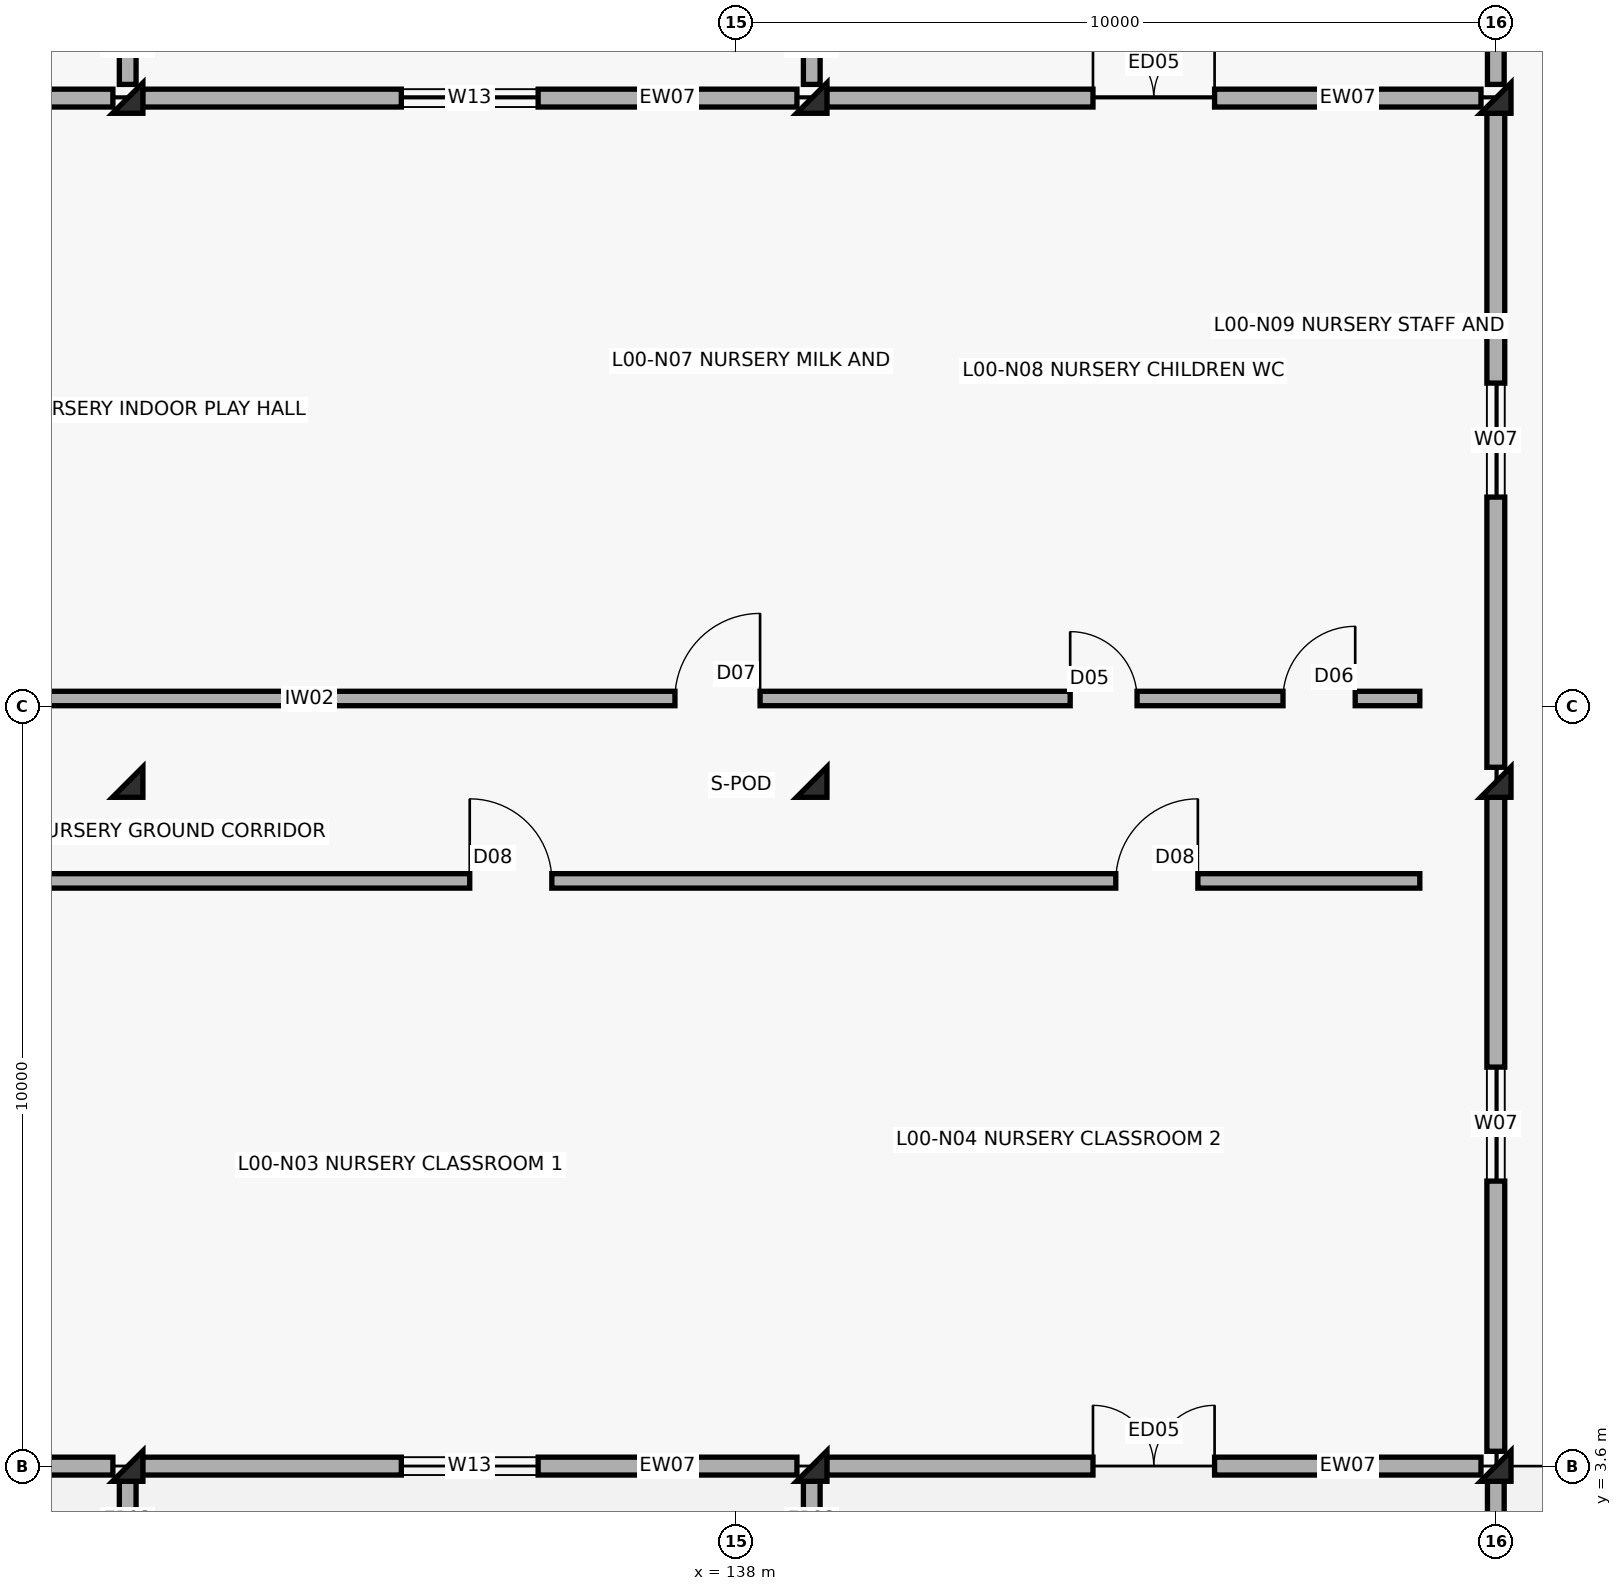
"""IFC4 building model, lengths in metres.
Left out: names, types, materials, properties, quantities, classifications, styles, units other than length and angle.
Written with IfcOpenShell. Run it as: python <this file> out.ifc"""

import sys

from ifc_helpers import new_model, si_unit, direction, frame, frame_2d, origin, origin_2d, place, context, subcontext, project, spatial, rectangle, extrude, element, fill, save


model = new_model("IFC4")
c1 = context("Model", 3, precision=1e-05, world=origin(), true_north=direction((0.0, 1.0)))
c2 = subcontext(c1, "Body", "Model", "MODEL_VIEW")
j1 = project(units=[si_unit("LENGTHUNIT", "METRE"), si_unit("PLANEANGLEUNIT", "RADIAN")], contexts=[c1])
p1 = place(None, origin())
s1 = spatial("IfcSite", under=j1, at=p1, CompositionType="ELEMENT")
p2 = place(p1, origin())
s2 = spatial("IfcBuilding", under=s1, at=p2, CompositionType="ELEMENT")
p3 = place(p2, origin())
s3 = spatial("IfcBuildingStorey", under=s2, at=p3, CompositionType="ELEMENT", Elevation=0.0)
for number, where, z_axis, x_axis in (
    (1, (130.0, 3.6, 0.0), (0.0, 0.0, 1.0), (1.0, 0.0, 0.0)),
    (2, (130.0, 12.6, 0.0), (0.0, 0.0, 1.0), (1.0, 0.0, 0.0)),
    (3, (130.0, 21.6, 0.0), (0.0, 0.0, 1.0), (1.0, 0.0, 0.0)),
    (4, (139.0, 3.6, 0.0), (0.0, 0.0, 1.0), (1.0, 0.0, 0.0)),
    (5, (139.0, 12.6, 0.0), (0.0, 0.0, 1.0), (1.0, 0.0, 0.0)),
    (6, (139.0, 21.6, 0.0), (0.0, 0.0, 1.0), (1.0, 0.0, 0.0)),
    (7, (148.0, 3.6, 0.0), (0.0, 0.0, 1.0), (1.0, 0.0, 0.0)),
    (8, (148.0, 12.6, 0.0), (0.0, 0.0, 1.0), (1.0, 0.0, 0.0)),
    (9, (148.0, 21.6, 0.0), (0.0, 0.0, 1.0), (1.0, 0.0, 0.0)),
):
    element("IfcColumn", number, at=place(p3, frame(where, z_axis=z_axis, x_axis=x_axis)), inside=s3, PredefinedType="COLUMN", context=c2, shape_type="SweptSolid", body=[
        extrude(rectangle(XDim=0.4, YDim=0.4, at=origin_2d()), origin(), (0.0, 0.0, 1.0), 4.5),
    ])
p4 = place(p3, frame((121.195, 3.6, 0.0), z_axis=(0.0, 0.0, 1.0), x_axis=(1.0, 0.0, 0.0)))
e10 = element("IfcWall", 10, at=p4, inside=s3, PredefinedType="SOLIDWALL", context=c2, shape_type="SweptSolid", body=[
    extrude(rectangle(XDim=8.61, YDim=0.235, at=frame_2d((4.305, 0.0))), origin(), (0.0, 0.0, 1.0), 3.5),
])
p5 = place(p4, frame((3.505, 0.0, 0.0)))
e11 = element("IfcOpeningElement", 11, at=p5, cuts=e10, PredefinedType="OPENING", context=c2, shape_type="SweptSolid", body=[
    extrude(rectangle(XDim=1.6, YDim=2.2, at=frame_2d((0.8, 1.1))), frame((0.0, 0.127, 0.0), z_axis=(0.0, -1.0, 0.0), x_axis=(1.0, 0.0, 0.0)), (0.0, 0.0, 1.0), 0.255),
])
p6 = place(p3, frame((130.195, 3.6, 0.0), z_axis=(0.0, 0.0, 1.0), x_axis=(1.0, 0.0, 0.0)))
e12 = element("IfcWall", 12, at=p6, inside=s3, PredefinedType="SOLIDWALL", context=c2, shape_type="SweptSolid", body=[
    extrude(rectangle(XDim=8.61, YDim=0.235, at=frame_2d((4.305, 0.0))), origin(), (0.0, 0.0, 1.0), 3.5),
])
p7 = place(p6, frame((3.405, 0.0, 0.45)))
e13 = element("IfcOpeningElement", 13, at=p7, cuts=e12, PredefinedType="OPENING", context=c2, shape_type="SweptSolid", body=[
    extrude(rectangle(XDim=1.8, YDim=1.8, at=frame_2d((0.9, 0.9))), frame((0.0, 0.127, 0.0), z_axis=(0.0, -1.0, 0.0), x_axis=(1.0, 0.0, 0.0)), (0.0, 0.0, 1.0), 0.255),
])
p8 = place(p3, frame((139.195, 3.6, 0.0), z_axis=(0.0, 0.0, 1.0), x_axis=(1.0, 0.0, 0.0)))
e14 = element("IfcWall", 14, at=p8, inside=s3, PredefinedType="SOLIDWALL", context=c2, shape_type="SweptSolid", body=[
    extrude(rectangle(XDim=8.61, YDim=0.235, at=frame_2d((4.305, 0.0))), origin(), (0.0, 0.0, 1.0), 3.5),
])
p9 = place(p8, frame((3.505, 0.0, 0.0)))
e15 = element("IfcOpeningElement", 15, at=p9, cuts=e14, PredefinedType="OPENING", context=c2, shape_type="SweptSolid", body=[
    extrude(rectangle(XDim=1.6, YDim=2.2, at=frame_2d((0.8, 1.1))), frame((0.0, 0.127, 0.0), z_axis=(0.0, -1.0, 0.0), x_axis=(1.0, 0.0, 0.0)), (0.0, 0.0, 1.0), 0.255),
])
p10 = place(p3, frame((121.195, 21.6, 0.0), z_axis=(0.0, 0.0, 1.0), x_axis=(1.0, 0.0, 0.0)))
e16 = element("IfcWall", 16, at=p10, inside=s3, PredefinedType="SOLIDWALL", context=c2, shape_type="SweptSolid", body=[
    extrude(rectangle(XDim=8.61, YDim=0.235, at=frame_2d((4.305, 0.0))), origin(), (0.0, 0.0, 1.0), 3.5),
])
p11 = place(p10, frame((3.505, 0.0, 0.0)))
e17 = element("IfcOpeningElement", 17, at=p11, cuts=e16, PredefinedType="OPENING", context=c2, shape_type="SweptSolid", body=[
    extrude(rectangle(XDim=1.6, YDim=2.2, at=frame_2d((0.8, 1.1))), frame((0.0, 0.127, 0.0), z_axis=(0.0, -1.0, 0.0), x_axis=(1.0, 0.0, 0.0)), (0.0, 0.0, 1.0), 0.255),
])
p12 = place(p3, frame((130.195, 21.6, 0.0), z_axis=(0.0, 0.0, 1.0), x_axis=(1.0, 0.0, 0.0)))
e18 = element("IfcWall", 18, at=p12, inside=s3, PredefinedType="SOLIDWALL", context=c2, shape_type="SweptSolid", body=[
    extrude(rectangle(XDim=8.61, YDim=0.235, at=frame_2d((4.305, 0.0))), origin(), (0.0, 0.0, 1.0), 3.5),
])
p13 = place(p12, frame((3.405, 0.0, 0.45)))
e19 = element("IfcOpeningElement", 19, at=p13, cuts=e18, PredefinedType="OPENING", context=c2, shape_type="SweptSolid", body=[
    extrude(rectangle(XDim=1.8, YDim=1.8, at=frame_2d((0.9, 0.9))), frame((0.0, 0.127, 0.0), z_axis=(0.0, -1.0, 0.0), x_axis=(1.0, 0.0, 0.0)), (0.0, 0.0, 1.0), 0.255),
])
p14 = place(p3, frame((139.195, 21.6, 0.0), z_axis=(0.0, 0.0, 1.0), x_axis=(1.0, 0.0, 0.0)))
e20 = element("IfcWall", 20, at=p14, inside=s3, PredefinedType="SOLIDWALL", context=c2, shape_type="SweptSolid", body=[
    extrude(rectangle(XDim=8.61, YDim=0.235, at=frame_2d((4.305, 0.0))), origin(), (0.0, 0.0, 1.0), 3.5),
])
p15 = place(p14, frame((3.505, 0.0, 0.0)))
e21 = element("IfcOpeningElement", 21, at=p15, cuts=e20, PredefinedType="OPENING", context=c2, shape_type="SweptSolid", body=[
    extrude(rectangle(XDim=1.6, YDim=2.2, at=frame_2d((0.8, 1.1))), frame((0.0, 0.127, 0.0), z_axis=(0.0, -1.0, 0.0), x_axis=(1.0, 0.0, 0.0)), (0.0, 0.0, 1.0), 0.255),
])
p16 = place(p3, frame((148.0, 3.795, 0.0), z_axis=(0.0, 0.0, 1.0), x_axis=(0.0, 1.0, 0.0)))
e22 = element("IfcWall", 22, at=p16, inside=s3, PredefinedType="SOLIDWALL", context=c2, shape_type="SweptSolid", body=[
    extrude(rectangle(XDim=8.61, YDim=0.235, at=frame_2d((4.305, 0.0))), origin(), (0.0, 0.0, 1.0), 3.5),
])
p17 = place(p16, frame((3.555, 0.0, 0.45)))
e23 = element("IfcOpeningElement", 23, at=p17, cuts=e22, PredefinedType="OPENING", context=c2, shape_type="SweptSolid", body=[
    extrude(rectangle(XDim=1.5, YDim=1.65, at=frame_2d((0.75, 0.825))), frame((0.0, 0.127, 0.0), z_axis=(0.0, -1.0, 0.0), x_axis=(1.0, 0.0, 0.0)), (0.0, 0.0, 1.0), 0.255),
])
p18 = place(p3, frame((148.0, 12.795, 0.0), z_axis=(0.0, 0.0, 1.0), x_axis=(0.0, 1.0, 0.0)))
e24 = element("IfcWall", 24, at=p18, inside=s3, PredefinedType="SOLIDWALL", context=c2, shape_type="SweptSolid", body=[
    extrude(rectangle(XDim=8.61, YDim=0.235, at=frame_2d((4.305, 0.0))), origin(), (0.0, 0.0, 1.0), 3.5),
])
p19 = place(p18, frame((3.555, 0.0, 0.45)))
e25 = element("IfcOpeningElement", 25, at=p19, cuts=e24, PredefinedType="OPENING", context=c2, shape_type="SweptSolid", body=[
    extrude(rectangle(XDim=1.5, YDim=1.65, at=frame_2d((0.75, 0.825))), frame((0.0, 0.127, 0.0), z_axis=(0.0, -1.0, 0.0), x_axis=(1.0, 0.0, 0.0)), (0.0, 0.0, 1.0), 0.255),
])
for number, where, z_axis, x_axis in (
    (26, (130.0, 2.55, 0.0), (0.0, 0.0, 1.0), (0.0, 1.0, 0.0)),
    (27, (130.0, 21.78, 0.0), (0.0, 0.0, 1.0), (0.0, 1.0, 0.0)),
    (28, (139.0, 2.55, 0.0), (0.0, 0.0, 1.0), (0.0, 1.0, 0.0)),
    (29, (139.0, 21.78, 0.0), (0.0, 0.0, 1.0), (0.0, 1.0, 0.0)),
    (30, (148.0, 2.55, 0.0), (0.0, 0.0, 1.0), (0.0, 1.0, 0.0)),
    (31, (148.0, 21.78, 0.0), (0.0, 0.0, 1.0), (0.0, 1.0, 0.0)),
):
    element("IfcWall", number, at=place(p3, frame(where, z_axis=z_axis, x_axis=x_axis)), inside=s3, PredefinedType="PARAPET", context=c2, shape_type="SweptSolid", body=[
        extrude(rectangle(XDim=0.87, YDim=0.22, at=frame_2d((0.435, 0.0))), origin(), (0.0, 0.0, 1.0), 4.5),
    ])
p20 = place(p3, frame((113.0, 11.3, 0.0), z_axis=(0.0, 0.0, 1.0), x_axis=(1.0, 0.0, 0.0)))
e32 = element("IfcWall", 32, at=p20, inside=s3, PredefinedType="SOLIDWALL", context=c2, shape_type="SweptSolid", body=[
    extrude(rectangle(XDim=34.0, YDim=0.19, at=frame_2d((17.0, 0.0))), origin(), (0.0, 0.0, 1.0), 3.6),
])
p21 = place(p20, frame((3.5, 0.0, 0.0)))
e33 = element("IfcOpeningElement", 33, at=p21, cuts=e32, PredefinedType="OPENING", context=c2, shape_type="SweptSolid", body=[
    extrude(rectangle(XDim=1.08, YDim=2.15, at=frame_2d((0.54, 1.075))), frame((0.0, 0.105, 0.0), z_axis=(0.0, -1.0, 0.0), x_axis=(1.0, 0.0, 0.0)), (0.0, 0.0, 1.0), 0.21),
])
p22 = place(p20, frame((12.5, 0.0, 0.0)))
e34 = element("IfcOpeningElement", 34, at=p22, cuts=e32, PredefinedType="OPENING", context=c2, shape_type="SweptSolid", body=[
    extrude(rectangle(XDim=1.08, YDim=2.15, at=frame_2d((0.54, 1.075))), frame((0.0, 0.105, 0.0), z_axis=(0.0, -1.0, 0.0), x_axis=(1.0, 0.0, 0.0)), (0.0, 0.0, 1.0), 0.21),
])
p23 = place(p20, frame((21.5, 0.0, 0.0)))
e35 = element("IfcOpeningElement", 35, at=p23, cuts=e32, PredefinedType="OPENING", context=c2, shape_type="SweptSolid", body=[
    extrude(rectangle(XDim=1.08, YDim=2.15, at=frame_2d((0.54, 1.075))), frame((0.0, 0.105, 0.0), z_axis=(0.0, -1.0, 0.0), x_axis=(1.0, 0.0, 0.0)), (0.0, 0.0, 1.0), 0.21),
])
p24 = place(p20, frame((30.0, 0.0, 0.0)))
e36 = element("IfcOpeningElement", 36, at=p24, cuts=e32, PredefinedType="OPENING", context=c2, shape_type="SweptSolid", body=[
    extrude(rectangle(XDim=1.08, YDim=2.15, at=frame_2d((0.54, 1.075))), frame((0.0, 0.105, 0.0), z_axis=(0.0, -1.0, 0.0), x_axis=(1.0, 0.0, 0.0)), (0.0, 0.0, 1.0), 0.21),
])
p25 = place(p3, frame((125.0, 13.7, 0.0), z_axis=(0.0, 0.0, 1.0), x_axis=(1.0, 0.0, 0.0)))
e37 = element("IfcWall", 37, at=p25, inside=s3, PredefinedType="SOLIDWALL", context=c2, shape_type="SweptSolid", body=[
    extrude(rectangle(XDim=22.0, YDim=0.19, at=frame_2d((11.0, 0.0))), origin(), (0.0, 0.0, 1.0), 3.6),
])
p26 = place(p25, frame((1.5, 0.0, 0.0)))
e38 = element("IfcOpeningElement", 38, at=p26, cuts=e37, PredefinedType="OPENING", context=c2, shape_type="SweptSolid", body=[
    extrude(rectangle(XDim=1.08, YDim=2.15, at=frame_2d((0.54, 1.075))), frame((0.0, 0.105, 0.0), z_axis=(0.0, -1.0, 0.0), x_axis=(1.0, 0.0, 0.0)), (0.0, 0.0, 1.0), 0.21),
])
p27 = place(p25, frame((12.2, 0.0, 0.0)))
e39 = element("IfcOpeningElement", 39, at=p27, cuts=e37, PredefinedType="OPENING", context=c2, shape_type="SweptSolid", body=[
    extrude(rectangle(XDim=1.12, YDim=2.15, at=frame_2d((0.56, 1.075))), frame((0.0, 0.105, 0.0), z_axis=(0.0, -1.0, 0.0), x_axis=(1.0, 0.0, 0.0)), (0.0, 0.0, 1.0), 0.21),
])
p28 = place(p25, frame((17.4, 0.0, 0.0)))
e40 = element("IfcOpeningElement", 40, at=p28, cuts=e37, PredefinedType="OPENING", context=c2, shape_type="SweptSolid", body=[
    extrude(rectangle(XDim=0.88, YDim=2.1, at=frame_2d((0.44, 1.05))), frame((0.0, 0.105, 0.0), z_axis=(0.0, -1.0, 0.0), x_axis=(1.0, 0.0, 0.0)), (0.0, 0.0, 1.0), 0.21),
])
p29 = place(p25, frame((20.2, 0.0, 0.0)))
e41 = element("IfcOpeningElement", 41, at=p29, cuts=e37, PredefinedType="OPENING", context=c2, shape_type="SweptSolid", body=[
    extrude(rectangle(XDim=0.95, YDim=2.1, at=frame_2d((0.475, 1.05))), frame((0.0, 0.105, 0.0), z_axis=(0.0, -1.0, 0.0), x_axis=(1.0, 0.0, 0.0)), (0.0, 0.0, 1.0), 0.21),
])
p30 = place(p7, origin())
e42 = element("IfcWindow", 42, at=p30, inside=s3, PartitioningType="TRIPLE_PANEL_VERTICAL", PredefinedType="WINDOW", context=c2, shape_type="SweptSolid", body=[
    extrude(rectangle(XDim=1.8, YDim=1.8, at=frame_2d((0.9, 0.9))), frame((0.0, 0.03, 0.0), z_axis=(0.0, -1.0, 0.0), x_axis=(1.0, 0.0, 0.0)), (0.0, 0.0, 1.0), 0.06),
])
fill(e13, e42)
p31 = place(p9, origin())
e43 = element("IfcDoor", 43, at=p31, inside=s3, OperationType="DOUBLE_DOOR_SINGLE_SWING", PredefinedType="DOOR", context=c2, shape_type="SweptSolid", body=[
    extrude(rectangle(XDim=1.6, YDim=2.2, at=frame_2d((0.8, 1.1))), frame((0.0, 0.025, 0.0), z_axis=(0.0, -1.0, 0.0), x_axis=(1.0, 0.0, 0.0)), (0.0, 0.0, 1.0), 0.05),
])
fill(e15, e43)
p32 = place(p13, origin())
e44 = element("IfcWindow", 44, at=p32, inside=s3, PartitioningType="TRIPLE_PANEL_VERTICAL", PredefinedType="WINDOW", context=c2, shape_type="SweptSolid", body=[
    extrude(rectangle(XDim=1.8, YDim=1.8, at=frame_2d((0.9, 0.9))), frame((0.0, 0.03, 0.0), z_axis=(0.0, -1.0, 0.0), x_axis=(1.0, 0.0, 0.0)), (0.0, 0.0, 1.0), 0.06),
])
fill(e19, e44)
p33 = place(p15, origin())
e45 = element("IfcDoor", 45, at=p33, inside=s3, OperationType="DOUBLE_DOOR_SINGLE_SWING", PredefinedType="DOOR", context=c2, shape_type="SweptSolid", body=[
    extrude(rectangle(XDim=1.6, YDim=2.2, at=frame_2d((0.8, 1.1))), frame((0.0, 0.025, 0.0), z_axis=(0.0, -1.0, 0.0), x_axis=(1.0, 0.0, 0.0)), (0.0, 0.0, 1.0), 0.05),
])
fill(e21, e45)
p34 = place(p17, origin())
e46 = element("IfcWindow", 46, at=p34, inside=s3, PartitioningType="DOUBLE_PANEL_VERTICAL", PredefinedType="WINDOW", context=c2, shape_type="SweptSolid", body=[
    extrude(rectangle(XDim=1.5, YDim=1.65, at=frame_2d((0.75, 0.825))), frame((0.0, 0.03, 0.0), z_axis=(0.0, -1.0, 0.0), x_axis=(1.0, 0.0, 0.0)), (0.0, 0.0, 1.0), 0.06),
])
fill(e23, e46)
p35 = place(p19, origin())
e47 = element("IfcWindow", 47, at=p35, inside=s3, PartitioningType="DOUBLE_PANEL_VERTICAL", PredefinedType="WINDOW", context=c2, shape_type="SweptSolid", body=[
    extrude(rectangle(XDim=1.5, YDim=1.65, at=frame_2d((0.75, 0.825))), frame((0.0, 0.03, 0.0), z_axis=(0.0, -1.0, 0.0), x_axis=(1.0, 0.0, 0.0)), (0.0, 0.0, 1.0), 0.06),
])
fill(e25, e47)
p36 = place(p23, origin())
e48 = element("IfcDoor", 48, at=p36, inside=s3, OperationType="SINGLE_SWING_LEFT", PredefinedType="DOOR", context=c2, shape_type="SweptSolid", body=[
    extrude(rectangle(XDim=1.08, YDim=2.15, at=frame_2d((0.54, 1.075))), frame((0.0, 0.025, 0.0), z_axis=(0.0, -1.0, 0.0), x_axis=(1.0, 0.0, 0.0)), (0.0, 0.0, 1.0), 0.05),
])
fill(e35, e48)
p37 = place(p24, origin())
e49 = element("IfcDoor", 49, at=p37, inside=s3, OperationType="SINGLE_SWING_RIGHT", PredefinedType="DOOR", context=c2, shape_type="SweptSolid", body=[
    extrude(rectangle(XDim=1.08, YDim=2.15, at=frame_2d((0.54, 1.075))), frame((0.0, 0.025, 0.0), z_axis=(0.0, -1.0, 0.0), x_axis=(1.0, 0.0, 0.0)), (0.0, 0.0, 1.0), 0.05),
])
fill(e36, e49)
p38 = place(p27, origin())
e50 = element("IfcDoor", 50, at=p38, inside=s3, OperationType="SINGLE_SWING_RIGHT", PredefinedType="DOOR", context=c2, shape_type="SweptSolid", body=[
    extrude(rectangle(XDim=1.12, YDim=2.15, at=frame_2d((0.56, 1.075))), frame((0.0, 0.025, 0.0), z_axis=(0.0, -1.0, 0.0), x_axis=(1.0, 0.0, 0.0)), (0.0, 0.0, 1.0), 0.05),
])
fill(e39, e50)
p39 = place(p28, origin())
e51 = element("IfcDoor", 51, at=p39, inside=s3, OperationType="SINGLE_SWING_LEFT", PredefinedType="DOOR", context=c2, shape_type="SweptSolid", body=[
    extrude(rectangle(XDim=0.88, YDim=2.1, at=frame_2d((0.44, 1.05))), frame((0.0, 0.025, 0.0), z_axis=(0.0, -1.0, 0.0), x_axis=(1.0, 0.0, 0.0)), (0.0, 0.0, 1.0), 0.05),
])
fill(e40, e51)
p40 = place(p29, origin())
e52 = element("IfcDoor", 52, at=p40, inside=s3, OperationType="SINGLE_SWING_RIGHT", PredefinedType="DOOR", context=c2, shape_type="SweptSolid", body=[
    extrude(rectangle(XDim=0.95, YDim=2.1, at=frame_2d((0.475, 1.05))), frame((0.0, 0.025, 0.0), z_axis=(0.0, -1.0, 0.0), x_axis=(1.0, 0.0, 0.0)), (0.0, 0.0, 1.0), 0.05),
])
fill(e41, e52)
save(model, sys.argv[1])
